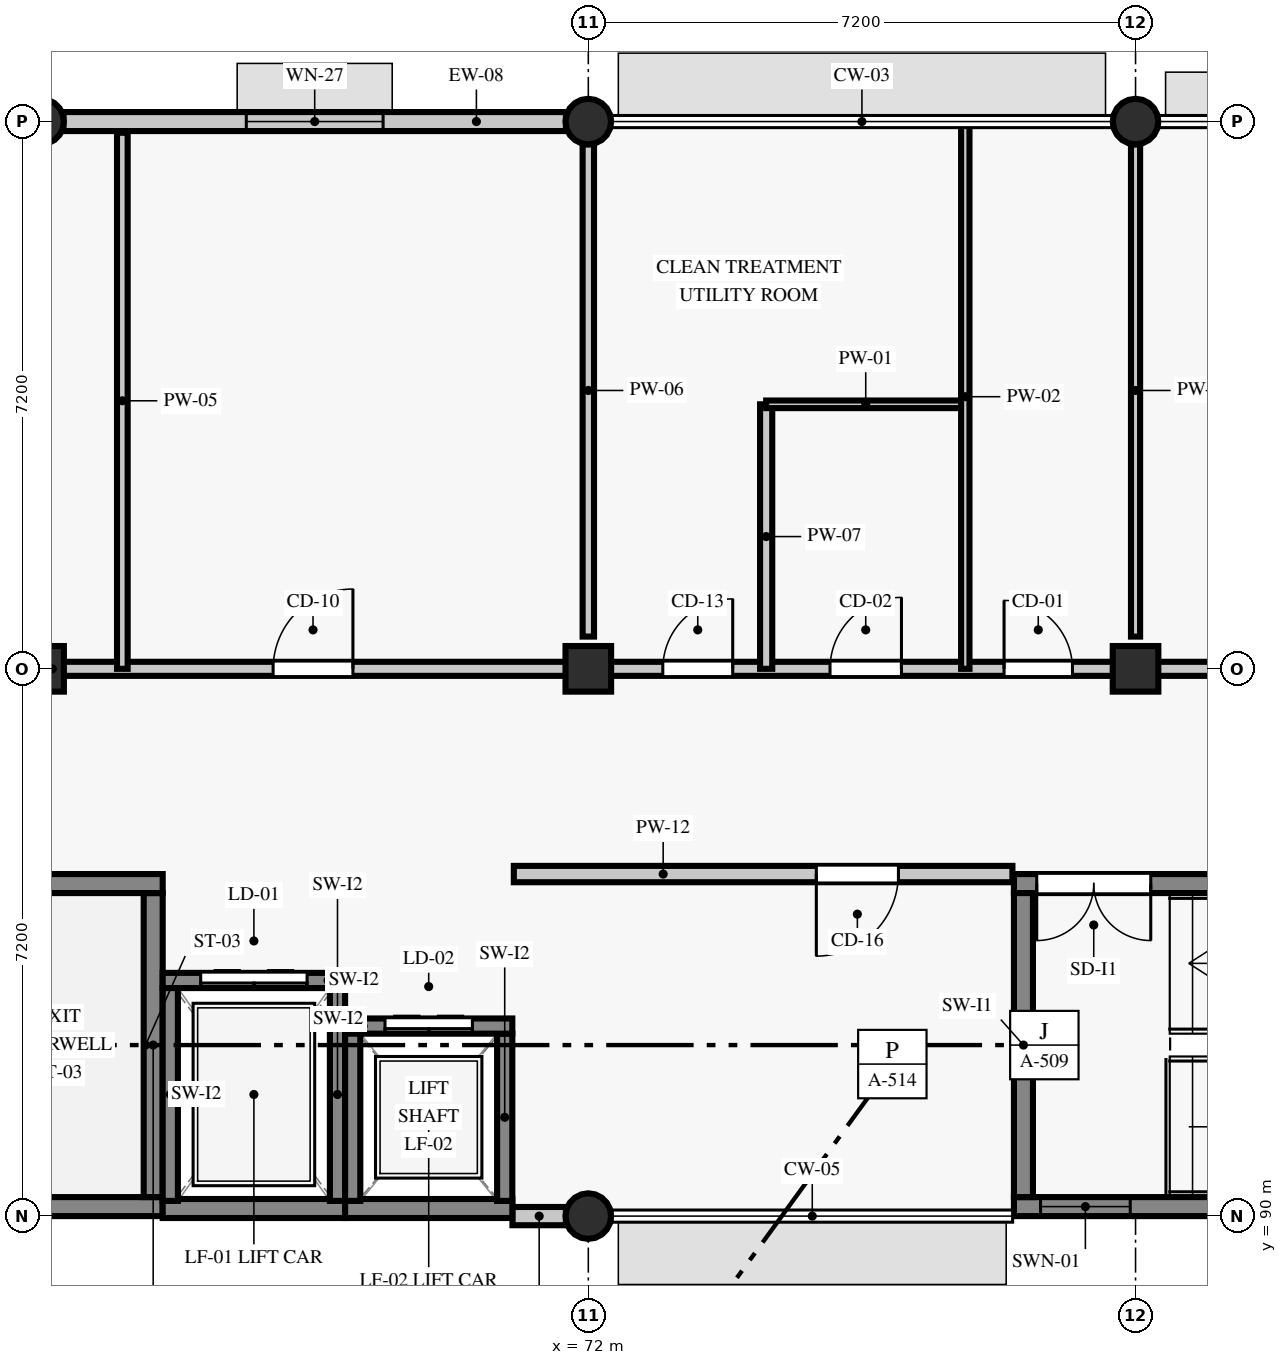
"""IFC4 building model, lengths in metres.
Left out: names, types, materials, properties, quantities, classifications, styles, units other than length and angle.
Written with IfcOpenShell. Run it as: python <this file> out.ifc"""

import sys

from ifc_helpers import new_model, si_unit, direction, frame, frame_2d, origin, origin_2d, place, context, subcontext, project, spatial, rectangle, circle, extrude, element, fill, save


model = new_model("IFC4")
c1 = context("Model", 3, precision=1e-05, world=origin(), true_north=direction((0.0, 1.0)))
c2 = subcontext(c1, "Body", "Model", "MODEL_VIEW")
j1 = project(units=[si_unit("LENGTHUNIT", "METRE"), si_unit("PLANEANGLEUNIT", "RADIAN")], contexts=[c1])
p1 = place(None, origin())
s1 = spatial("IfcSite", under=j1, at=p1, CompositionType="ELEMENT")
p2 = place(p1, origin())
s2 = spatial("IfcBuilding", under=s1, at=p2, CompositionType="ELEMENT")
p3 = place(p2, frame((0.0, 0.0, 13.8)))
s3 = spatial("IfcBuildingStorey", under=s2, at=p3, CompositionType="ELEMENT", Elevation=13.8)
p4 = place(p3, frame((64.8, 97.2, 0.0), z_axis=(0.0, 0.0, 1.0), x_axis=(1.0, 0.0, 0.0)))
e1 = element("IfcColumn", 1, at=p4, inside=s3, PredefinedType="COLUMN", context=c2, shape_type="SweptSolid", body=[
    extrude(rectangle(XDim=0.6, YDim=0.6, at=origin_2d()), origin(), (0.0, 0.0, 1.0), 3.945),
])
for number, where, z_axis, x_axis in (
    (2, (64.8, 104.4, 0.0), (0.0, 0.0, 1.0), (1.0, 0.0, 0.0)),
    (3, (72.0, 90.0, 0.0), (0.0, 0.0, 1.0), (1.0, 0.0, 0.0)),
):
    element("IfcColumn", number, at=place(p3, frame(where, z_axis=z_axis, x_axis=x_axis)), inside=s3, PredefinedType="COLUMN", context=c2, shape_type="SweptSolid", body=[
        extrude(circle(Radius=0.3, at=origin_2d()), origin(), (0.0, 0.0, 1.0), 3.945),
    ])
p5 = place(p3, frame((72.0, 97.2, 0.0), z_axis=(0.0, 0.0, 1.0), x_axis=(1.0, 0.0, 0.0)))
e4 = element("IfcColumn", 4, at=p5, inside=s3, PredefinedType="COLUMN", context=c2, shape_type="SweptSolid", body=[
    extrude(rectangle(XDim=0.6, YDim=0.6, at=origin_2d()), origin(), (0.0, 0.0, 1.0), 3.945),
])
p6 = place(p3, frame((72.0, 104.4, 0.0), z_axis=(0.0, 0.0, 1.0), x_axis=(1.0, 0.0, 0.0)))
e5 = element("IfcColumn", 5, at=p6, inside=s3, PredefinedType="COLUMN", context=c2, shape_type="SweptSolid", body=[
    extrude(circle(Radius=0.3, at=origin_2d()), origin(), (0.0, 0.0, 1.0), 3.945),
])
p7 = place(p3, frame((79.2, 97.2, 0.0), z_axis=(0.0, 0.0, 1.0), x_axis=(1.0, 0.0, 0.0)))
e6 = element("IfcColumn", 6, at=p7, inside=s3, PredefinedType="COLUMN", context=c2, shape_type="SweptSolid", body=[
    extrude(rectangle(XDim=0.6, YDim=0.6, at=origin_2d()), origin(), (0.0, 0.0, 1.0), 3.945),
])
p8 = place(p3, frame((79.2, 104.4, 0.0), z_axis=(0.0, 0.0, 1.0), x_axis=(1.0, 0.0, 0.0)))
e7 = element("IfcColumn", 7, at=p8, inside=s3, PredefinedType="COLUMN", context=c2, shape_type="SweptSolid", body=[
    extrude(circle(Radius=0.3, at=origin_2d()), origin(), (0.0, 0.0, 1.0), 3.945),
])
p9 = place(p3, frame((71.002, 90.0, 0.0), z_axis=(0.0, 0.0, 1.0), x_axis=(1.0, 0.0, 0.0)))
e8 = element("IfcWall", 8, at=p9, inside=s3, PredefinedType="STANDARD", context=c2, shape_type="SweptSolid", body=[
    extrude(rectangle(XDim=0.703, YDim=0.24, at=frame_2d((0.352, 0.0))), origin(), (0.0, 0.0, 1.0), 3.945),
])
p10 = place(p3, frame((71.705, 104.4, 0.0), z_axis=(0.0, 0.0, 1.0), x_axis=(-1.0, 0.0, 0.0)))
e9 = element("IfcWall", 9, at=p10, inside=s3, PredefinedType="STANDARD", context=c2, shape_type="SweptSolid", body=[
    extrude(rectangle(XDim=6.61, YDim=0.25, at=frame_2d((3.305, 0.0))), origin(), (0.0, 0.0, 1.0), 3.295),
])
p11 = place(p10, frame((2.405, 0.0, 0.9)))
e10 = element("IfcOpeningElement", 10, at=p11, cuts=e9, PredefinedType="OPENING", context=c2, shape_type="SweptSolid", body=[
    extrude(rectangle(XDim=1.8, YDim=1.54, at=frame_2d((0.9, 0.77))), frame((0.0, 0.135, 0.0), z_axis=(0.0, -1.0, 0.0), x_axis=(1.0, 0.0, 0.0)), (0.0, 0.0, 1.0), 0.27),
])
p12 = place(p3, frame((57.6, 90.125, 0.0), z_axis=(0.0, 0.0, 1.0), x_axis=(1.0, 0.0, 0.0)))
e11 = element("IfcWall", 11, at=p12, inside=s3, PredefinedType="SHEAR", context=c2, shape_type="SweptSolid", body=[
    extrude(rectangle(XDim=8.8, YDim=0.25, at=frame_2d((4.4, 0.0))), origin(), (0.0, 0.0, 1.0), 3.945),
])
p13 = place(p12, frame((0.35, 0.0, 0.92)))
e12 = element("IfcOpeningElement", 12, at=p13, cuts=e11, PredefinedType="OPENING", context=c2, shape_type="SweptSolid", body=[
    extrude(rectangle(XDim=1.18, YDim=1.48, at=frame_2d((0.59, 0.74))), frame((0.0, 0.135, 0.0), z_axis=(0.0, -1.0, 0.0), x_axis=(1.0, 0.0, 0.0)), (0.0, 0.0, 1.0), 0.27),
])
p14 = place(p3, frame((66.275, 90.25, 0.0), z_axis=(0.0, 0.0, 1.0), x_axis=(0.0, 1.0, 0.0)))
e13 = element("IfcWall", 13, at=p14, inside=s3, PredefinedType="SHEAR", context=c2, shape_type="SweptSolid", body=[
    extrude(rectangle(XDim=4.0, YDim=0.25, at=frame_2d((2.0, 0.0))), origin(), (0.0, 0.0, 1.0), 3.945),
])
p15 = place(p3, frame((66.4, 94.375, 0.0), z_axis=(0.0, 0.0, 1.0), x_axis=(-1.0, 0.0, 0.0)))
e14 = element("IfcWall", 14, at=p15, inside=s3, PredefinedType="SHEAR", context=c2, shape_type="SweptSolid", body=[
    extrude(rectangle(XDim=8.8, YDim=0.25, at=frame_2d((4.4, 0.0))), origin(), (0.0, 0.0, 1.0), 3.945),
])
p16 = place(p15, frame((7.0, 0.0, 0.0)))
e15 = element("IfcOpeningElement", 15, at=p16, cuts=e14, PredefinedType="OPENING", context=c2, shape_type="SweptSolid", body=[
    extrude(rectangle(XDim=1.5, YDim=2.15, at=frame_2d((0.75, 1.075))), frame((0.0, 0.135, 0.0), z_axis=(0.0, -1.0, 0.0), x_axis=(1.0, 0.0, 0.0)), (0.0, 0.0, 1.0), 0.27),
])
p17 = place(p3, frame((77.6, 90.125, 0.0), z_axis=(0.0, 0.0, 1.0), x_axis=(1.0, 0.0, 0.0)))
e16 = element("IfcWall", 16, at=p17, inside=s3, PredefinedType="SHEAR", context=c2, shape_type="SweptSolid", body=[
    extrude(rectangle(XDim=8.8, YDim=0.25, at=frame_2d((4.4, 0.0))), origin(), (0.0, 0.0, 1.0), 3.945),
])
p18 = place(p17, frame((0.35, 0.0, 0.92)))
e17 = element("IfcOpeningElement", 17, at=p18, cuts=e16, PredefinedType="OPENING", context=c2, shape_type="SweptSolid", body=[
    extrude(rectangle(XDim=1.18, YDim=1.48, at=frame_2d((0.59, 0.74))), frame((0.0, 0.135, 0.0), z_axis=(0.0, -1.0, 0.0), x_axis=(1.0, 0.0, 0.0)), (0.0, 0.0, 1.0), 0.27),
])
p19 = place(p3, frame((86.4, 94.375, 0.0), z_axis=(0.0, 0.0, 1.0), x_axis=(-1.0, 0.0, 0.0)))
e18 = element("IfcWall", 18, at=p19, inside=s3, PredefinedType="SHEAR", context=c2, shape_type="SweptSolid", body=[
    extrude(rectangle(XDim=8.8, YDim=0.25, at=frame_2d((4.4, 0.0))), origin(), (0.0, 0.0, 1.0), 3.945),
])
p20 = place(p19, frame((7.0, 0.0, 0.0)))
e19 = element("IfcOpeningElement", 19, at=p20, cuts=e18, PredefinedType="OPENING", context=c2, shape_type="SweptSolid", body=[
    extrude(rectangle(XDim=1.5, YDim=2.15, at=frame_2d((0.75, 1.075))), frame((0.0, 0.135, 0.0), z_axis=(0.0, -1.0, 0.0), x_axis=(1.0, 0.0, 0.0)), (0.0, 0.0, 1.0), 0.27),
])
p21 = place(p3, frame((77.725, 94.25, 0.0), z_axis=(0.0, 0.0, 1.0), x_axis=(0.0, -1.0, 0.0)))
e20 = element("IfcWall", 20, at=p21, inside=s3, PredefinedType="SHEAR", context=c2, shape_type="SweptSolid", body=[
    extrude(rectangle(XDim=4.0, YDim=0.25, at=frame_2d((2.0, 0.0))), origin(), (0.0, 0.0, 1.0), 3.945),
])
p22 = place(p3, frame((66.4, 90.1, 0.0), z_axis=(0.0, 0.0, 1.0), x_axis=(1.0, 0.0, 0.0)))
e21 = element("IfcWall", 21, at=p22, inside=s3, PredefinedType="SHEAR", context=c2, shape_type="SweptSolid", body=[
    extrude(rectangle(XDim=2.4, YDim=0.25, at=frame_2d((1.2, 0.0))), origin(), (0.0, 0.0, 1.0), 3.945),
])
p23 = place(p3, frame((68.7, 90.2, 0.0), z_axis=(0.0, 0.0, 1.0), x_axis=(0.0, 1.0, 0.0)))
e22 = element("IfcWall", 22, at=p23, inside=s3, PredefinedType="SHEAR", context=c2, shape_type="SweptSolid", body=[
    extrude(rectangle(XDim=2.8, YDim=0.2, at=frame_2d((1.4, 0.0))), origin(), (0.0, 0.0, 1.0), 3.945),
])
p24 = place(p3, frame((68.8, 93.1, 0.0), z_axis=(0.0, 0.0, 1.0), x_axis=(-1.0, 0.0, 0.0)))
e23 = element("IfcWall", 23, at=p24, inside=s3, PredefinedType="SHEAR", context=c2, shape_type="SweptSolid", body=[
    extrude(rectangle(XDim=2.4, YDim=0.2, at=frame_2d((1.2, 0.0))), origin(), (0.0, 0.0, 1.0), 3.945),
])
p25 = place(p24, frame((0.5, 0.0, 0.0)))
e24 = element("IfcOpeningElement", 24, at=p25, cuts=e23, PredefinedType="OPENING", context=c2, shape_type="SweptSolid", body=[
    extrude(rectangle(XDim=1.4, YDim=2.15, at=frame_2d((0.7, 1.075))), frame((0.0, 0.11, 0.0), z_axis=(0.0, -1.0, 0.0), x_axis=(1.0, 0.0, 0.0)), (0.0, 0.0, 1.0), 0.22),
])
p26 = place(p3, frame((66.5, 93.0, 0.0), z_axis=(0.0, 0.0, 1.0), x_axis=(0.0, -1.0, 0.0)))
e25 = element("IfcWall", 25, at=p26, inside=s3, PredefinedType="SHEAR", context=c2, shape_type="SweptSolid", body=[
    extrude(rectangle(XDim=2.8, YDim=0.2, at=frame_2d((1.4, 0.0))), origin(), (0.0, 0.0, 1.0), 3.945),
])
p27 = place(p3, frame((68.8, 90.1, 0.0), z_axis=(0.0, 0.0, 1.0), x_axis=(1.0, 0.0, 0.0)))
e26 = element("IfcWall", 26, at=p27, inside=s3, PredefinedType="SHEAR", context=c2, shape_type="SweptSolid", body=[
    extrude(rectangle(XDim=2.2, YDim=0.25, at=frame_2d((1.1, 0.0))), origin(), (0.0, 0.0, 1.0), 3.945),
])
p28 = place(p3, frame((70.9, 90.2, 0.0), z_axis=(0.0, 0.0, 1.0), x_axis=(0.0, 1.0, 0.0)))
e27 = element("IfcWall", 27, at=p28, inside=s3, PredefinedType="SHEAR", context=c2, shape_type="SweptSolid", body=[
    extrude(rectangle(XDim=2.2, YDim=0.2, at=frame_2d((1.1, 0.0))), origin(), (0.0, 0.0, 1.0), 3.945),
])
p29 = place(p3, frame((71.0, 92.5, 0.0), z_axis=(0.0, 0.0, 1.0), x_axis=(-1.0, 0.0, 0.0)))
e28 = element("IfcWall", 28, at=p29, inside=s3, PredefinedType="SHEAR", context=c2, shape_type="SweptSolid", body=[
    extrude(rectangle(XDim=2.2, YDim=0.2, at=frame_2d((1.1, 0.0))), origin(), (0.0, 0.0, 1.0), 3.945),
])
p30 = place(p29, frame((0.525, 0.0, 0.0)))
e29 = element("IfcOpeningElement", 29, at=p30, cuts=e28, PredefinedType="OPENING", context=c2, shape_type="SweptSolid", body=[
    extrude(rectangle(XDim=1.15, YDim=2.15, at=frame_2d((0.575, 1.075))), frame((0.0, 0.11, 0.0), z_axis=(0.0, -1.0, 0.0), x_axis=(1.0, 0.0, 0.0)), (0.0, 0.0, 1.0), 0.22),
])
p31 = place(p3, frame((68.9, 92.4, 0.0), z_axis=(0.0, 0.0, 1.0), x_axis=(0.0, -1.0, 0.0)))
e30 = element("IfcWall", 30, at=p31, inside=s3, PredefinedType="SHEAR", context=c2, shape_type="SweptSolid", body=[
    extrude(rectangle(XDim=2.2, YDim=0.2, at=frame_2d((1.1, 0.0))), origin(), (0.0, 0.0, 1.0), 3.945),
])
p32 = place(p3, frame((50.7, 97.2, 0.0), z_axis=(0.0, 0.0, 1.0), x_axis=(1.0, 0.0, 0.0)))
e31 = element("IfcWall", 31, at=p32, inside=s3, PredefinedType="PARTITIONING", context=c2, shape_type="SweptSolid", body=[
    extrude(rectangle(XDim=35.4, YDim=0.185, at=frame_2d((17.7, 0.0))), origin(), (0.0, 0.0, 1.0), 3.195),
])
p33 = place(p32, frame((3.124, 0.0, 0.0)))
e32 = element("IfcOpeningElement", 32, at=p33, cuts=e31, PredefinedType="OPENING", context=c2, shape_type="SweptSolid", body=[
    extrude(rectangle(XDim=0.9, YDim=2.13, at=frame_2d((0.45, 1.065))), frame((0.0, 0.103, 0.0), z_axis=(0.0, -1.0, 0.0), x_axis=(1.0, 0.0, 0.0)), (0.0, 0.0, 1.0), 0.205),
])
p34 = place(p32, frame((8.686, 0.0, 0.0)))
e33 = element("IfcOpeningElement", 33, at=p34, cuts=e31, PredefinedType="OPENING", context=c2, shape_type="SweptSolid", body=[
    extrude(rectangle(XDim=0.95, YDim=2.13, at=frame_2d((0.475, 1.065))), frame((0.0, 0.103, 0.0), z_axis=(0.0, -1.0, 0.0), x_axis=(1.0, 0.0, 0.0)), (0.0, 0.0, 1.0), 0.205),
])
p35 = place(p32, frame((10.341, 0.0, 0.0)))
e34 = element("IfcOpeningElement", 34, at=p35, cuts=e31, PredefinedType="OPENING", context=c2, shape_type="SweptSolid", body=[
    extrude(rectangle(XDim=1.0, YDim=2.13, at=frame_2d((0.5, 1.065))), frame((0.0, 0.103, 0.0), z_axis=(0.0, -1.0, 0.0), x_axis=(1.0, 0.0, 0.0)), (0.0, 0.0, 1.0), 0.205),
])
p36 = place(p32, frame((17.153, 0.0, 0.0)))
e35 = element("IfcOpeningElement", 35, at=p36, cuts=e31, PredefinedType="OPENING", context=c2, shape_type="SweptSolid", body=[
    extrude(rectangle(XDim=1.05, YDim=2.13, at=frame_2d((0.525, 1.065))), frame((0.0, 0.103, 0.0), z_axis=(0.0, -1.0, 0.0), x_axis=(1.0, 0.0, 0.0)), (0.0, 0.0, 1.0), 0.205),
])
p37 = place(p32, frame((22.28, 0.0, 0.0)))
e36 = element("IfcOpeningElement", 36, at=p37, cuts=e31, PredefinedType="OPENING", context=c2, shape_type="SweptSolid", body=[
    extrude(rectangle(XDim=0.92, YDim=2.18, at=frame_2d((0.46, 1.09))), frame((0.0, 0.103, 0.0), z_axis=(0.0, -1.0, 0.0), x_axis=(1.0, 0.0, 0.0)), (0.0, 0.0, 1.0), 0.205),
])
p38 = place(p32, frame((24.48, 0.0, 0.0)))
e37 = element("IfcOpeningElement", 37, at=p38, cuts=e31, PredefinedType="OPENING", context=c2, shape_type="SweptSolid", body=[
    extrude(rectangle(XDim=0.94, YDim=2.08, at=frame_2d((0.47, 1.04))), frame((0.0, 0.103, 0.0), z_axis=(0.0, -1.0, 0.0), x_axis=(1.0, 0.0, 0.0)), (0.0, 0.0, 1.0), 0.205),
])
p39 = place(p32, frame((26.77, 0.0, 0.0)))
e38 = element("IfcOpeningElement", 38, at=p39, cuts=e31, PredefinedType="OPENING", context=c2, shape_type="SweptSolid", body=[
    extrude(rectangle(XDim=0.9, YDim=2.08, at=frame_2d((0.45, 1.04))), frame((0.0, 0.103, 0.0), z_axis=(0.0, -1.0, 0.0), x_axis=(1.0, 0.0, 0.0)), (0.0, 0.0, 1.0), 0.205),
])
p40 = place(p32, frame((31.573, 0.0, 0.0)))
e39 = element("IfcOpeningElement", 39, at=p40, cuts=e31, PredefinedType="OPENING", context=c2, shape_type="SweptSolid", body=[
    extrude(rectangle(XDim=0.97, YDim=2.18, at=frame_2d((0.485, 1.09))), frame((0.0, 0.103, 0.0), z_axis=(0.0, -1.0, 0.0), x_axis=(1.0, 0.0, 0.0)), (0.0, 0.0, 1.0), 0.205),
])
p41 = place(p3, frame((65.869, 97.2, 0.0), z_axis=(0.0, 0.0, 1.0), x_axis=(0.0, 1.0, 0.0)))
e40 = element("IfcWall", 40, at=p41, inside=s3, PredefinedType="PARTITIONING", context=c2, shape_type="SweptSolid", body=[
    extrude(rectangle(XDim=7.053, YDim=0.14, at=frame_2d((3.526, 0.0))), origin(), (0.0, 0.0, 1.0), 3.195),
])
p42 = place(p3, frame((72.0, 97.624, 0.0), z_axis=(0.0, 0.0, 1.0), x_axis=(0.0, 1.0, 0.0)))
e41 = element("IfcWall", 41, at=p42, inside=s3, PredefinedType="PARTITIONING", context=c2, shape_type="SweptSolid", body=[
    extrude(rectangle(XDim=6.476, YDim=0.15, at=frame_2d((3.238, 0.0))), origin(), (0.0, 0.0, 1.0), 3.395),
])
p43 = place(p3, frame((74.34, 97.2, 0.0), z_axis=(0.0, 0.0, 1.0), x_axis=(0.0, 1.0, 0.0)))
e42 = element("IfcWall", 42, at=p43, inside=s3, PredefinedType="PARTITIONING", context=c2, shape_type="SweptSolid", body=[
    extrude(rectangle(XDim=3.48, YDim=0.16, at=frame_2d((1.74, 0.0))), origin(), (0.0, 0.0, 1.0), 3.195),
])
p44 = place(p3, frame((74.34, 100.68, 0.0), z_axis=(0.0, 0.0, 1.0), x_axis=(1.0, 0.0, 0.0)))
e43 = element("IfcWall", 43, at=p44, inside=s3, PredefinedType="PARTITIONING", context=c2, shape_type="SweptSolid", body=[
    extrude(rectangle(XDim=2.62, YDim=0.1, at=frame_2d((1.31, 0.0))), origin(), (0.0, 0.0, 1.0), 3.445),
])
p45 = place(p3, frame((76.96, 97.2, 0.0), z_axis=(0.0, 0.0, 1.0), x_axis=(0.0, 1.0, 0.0)))
e44 = element("IfcWall", 44, at=p45, inside=s3, PredefinedType="PARTITIONING", context=c2, shape_type="SweptSolid", body=[
    extrude(rectangle(XDim=7.16, YDim=0.11, at=frame_2d((3.58, 0.0))), origin(), (0.0, 0.0, 1.0), 3.195),
])
p46 = place(p3, frame((79.2, 97.624, 0.0), z_axis=(0.0, 0.0, 1.0), x_axis=(0.0, 1.0, 0.0)))
e45 = element("IfcWall", 45, at=p46, inside=s3, PredefinedType="PARTITIONING", context=c2, shape_type="SweptSolid", body=[
    extrude(rectangle(XDim=6.476, YDim=0.12, at=frame_2d((3.238, 0.0))), origin(), (0.0, 0.0, 1.0), 3.395),
])
p47 = place(p3, frame((71.02, 94.5, 0.0), z_axis=(0.0, 0.0, 1.0), x_axis=(1.0, 0.0, 0.0)))
e46 = element("IfcWall", 46, at=p47, inside=s3, PredefinedType="PARTITIONING", context=c2, shape_type="SweptSolid", body=[
    extrude(rectangle(XDim=6.56, YDim=0.215, at=frame_2d((3.28, 0.0))), origin(), (0.0, 0.0, 1.0), 3.395),
])
p48 = place(p47, frame((3.98, 0.0, 0.0)))
e47 = element("IfcOpeningElement", 47, at=p48, cuts=e46, PredefinedType="OPENING", context=c2, shape_type="SweptSolid", body=[
    extrude(rectangle(XDim=1.08, YDim=2.18, at=frame_2d((0.54, 1.09))), frame((0.0, 0.117, 0.0), z_axis=(0.0, -1.0, 0.0), x_axis=(1.0, 0.0, 0.0)), (0.0, 0.0, 1.0), 0.235),
])
p49 = place(p11, origin())
e48 = element("IfcWindow", 48, at=p49, inside=s3, PartitioningType="SINGLE_PANEL", PredefinedType="WINDOW", context=c2, shape_type="SweptSolid", body=[
    extrude(rectangle(XDim=1.8, YDim=1.54, at=frame_2d((0.9, 0.77))), frame((0.0, 0.03, 0.0), z_axis=(0.0, -1.0, 0.0), x_axis=(1.0, 0.0, 0.0)), (0.0, 0.0, 1.0), 0.06),
])
fill(e10, e48)
p50 = place(p18, origin())
e49 = element("IfcWindow", 49, at=p50, inside=s3, PartitioningType="SINGLE_PANEL", PredefinedType="WINDOW", context=c2, shape_type="SweptSolid", body=[
    extrude(rectangle(XDim=1.18, YDim=1.48, at=frame_2d((0.59, 0.74))), frame((0.0, 0.03, 0.0), z_axis=(0.0, -1.0, 0.0), x_axis=(1.0, 0.0, 0.0)), (0.0, 0.0, 1.0), 0.06),
])
fill(e17, e49)
p51 = place(p20, origin())
e50 = element("IfcDoor", 50, at=p51, inside=s3, OperationType="DOUBLE_DOOR_SINGLE_SWING", PredefinedType="DOOR", context=c2, shape_type="SweptSolid", body=[
    extrude(rectangle(XDim=1.5, YDim=2.15, at=frame_2d((0.75, 1.075))), frame((0.0, 0.025, 0.0), z_axis=(0.0, -1.0, 0.0), x_axis=(1.0, 0.0, 0.0)), (0.0, 0.0, 1.0), 0.05),
])
fill(e19, e50)
p52 = place(p25, frame((1.4, 0.0, 0.0), z_axis=(0.0, 0.0, 1.0), x_axis=(-1.0, 0.0, 0.0)))
e51 = element("IfcDoor", 51, at=p52, inside=s3, OperationType="DOUBLE_DOOR_SLIDING", PredefinedType="DOOR", context=c2, shape_type="SweptSolid", body=[
    extrude(rectangle(XDim=1.4, YDim=2.15, at=frame_2d((0.7, 1.075))), frame((0.0, 0.025, 0.0), z_axis=(0.0, -1.0, 0.0), x_axis=(1.0, 0.0, 0.0)), (0.0, 0.0, 1.0), 0.05),
])
fill(e24, e51)
p53 = place(p30, frame((1.15, 0.0, 0.0), z_axis=(0.0, 0.0, 1.0), x_axis=(-1.0, 0.0, 0.0)))
e52 = element("IfcDoor", 52, at=p53, inside=s3, OperationType="DOUBLE_DOOR_SLIDING", PredefinedType="DOOR", context=c2, shape_type="SweptSolid", body=[
    extrude(rectangle(XDim=1.15, YDim=2.15, at=frame_2d((0.575, 1.075))), frame((0.0, 0.025, 0.0), z_axis=(0.0, -1.0, 0.0), x_axis=(1.0, 0.0, 0.0)), (0.0, 0.0, 1.0), 0.05),
])
fill(e29, e52)
p54 = place(p36, origin())
e53 = element("IfcDoor", 53, at=p54, inside=s3, OperationType="SINGLE_SWING_RIGHT", PredefinedType="DOOR", context=c2, shape_type="SweptSolid", body=[
    extrude(rectangle(XDim=1.05, YDim=2.13, at=frame_2d((0.525, 1.065))), frame((0.0, 0.025, 0.0), z_axis=(0.0, -1.0, 0.0), x_axis=(1.0, 0.0, 0.0)), (0.0, 0.0, 1.0), 0.05),
])
fill(e35, e53)
p55 = place(p37, origin())
e54 = element("IfcDoor", 54, at=p55, inside=s3, OperationType="SINGLE_SWING_RIGHT", PredefinedType="DOOR", context=c2, shape_type="SweptSolid", body=[
    extrude(rectangle(XDim=0.92, YDim=2.18, at=frame_2d((0.46, 1.09))), frame((0.0, 0.025, 0.0), z_axis=(0.0, -1.0, 0.0), x_axis=(1.0, 0.0, 0.0)), (0.0, 0.0, 1.0), 0.05),
])
fill(e36, e54)
p56 = place(p38, origin())
e55 = element("IfcDoor", 55, at=p56, inside=s3, OperationType="SINGLE_SWING_RIGHT", PredefinedType="DOOR", context=c2, shape_type="SweptSolid", body=[
    extrude(rectangle(XDim=0.94, YDim=2.08, at=frame_2d((0.47, 1.04))), frame((0.0, 0.025, 0.0), z_axis=(0.0, -1.0, 0.0), x_axis=(1.0, 0.0, 0.0)), (0.0, 0.0, 1.0), 0.05),
])
fill(e37, e55)
p57 = place(p39, origin())
e56 = element("IfcDoor", 56, at=p57, inside=s3, OperationType="SINGLE_SWING_LEFT", PredefinedType="DOOR", context=c2, shape_type="SweptSolid", body=[
    extrude(rectangle(XDim=0.9, YDim=2.08, at=frame_2d((0.45, 1.04))), frame((0.0, 0.025, 0.0), z_axis=(0.0, -1.0, 0.0), x_axis=(1.0, 0.0, 0.0)), (0.0, 0.0, 1.0), 0.05),
])
fill(e38, e56)
p58 = place(p48, frame((1.08, 0.0, 0.0), z_axis=(0.0, 0.0, 1.0), x_axis=(-1.0, 0.0, 0.0)))
e57 = element("IfcDoor", 57, at=p58, inside=s3, OperationType="SINGLE_SWING_RIGHT", PredefinedType="DOOR", context=c2, shape_type="SweptSolid", body=[
    extrude(rectangle(XDim=1.08, YDim=2.18, at=frame_2d((0.54, 1.09))), frame((0.0, 0.025, 0.0), z_axis=(0.0, -1.0, 0.0), x_axis=(1.0, 0.0, 0.0)), (0.0, 0.0, 1.0), 0.05),
])
fill(e47, e57)
save(model, sys.argv[1])
